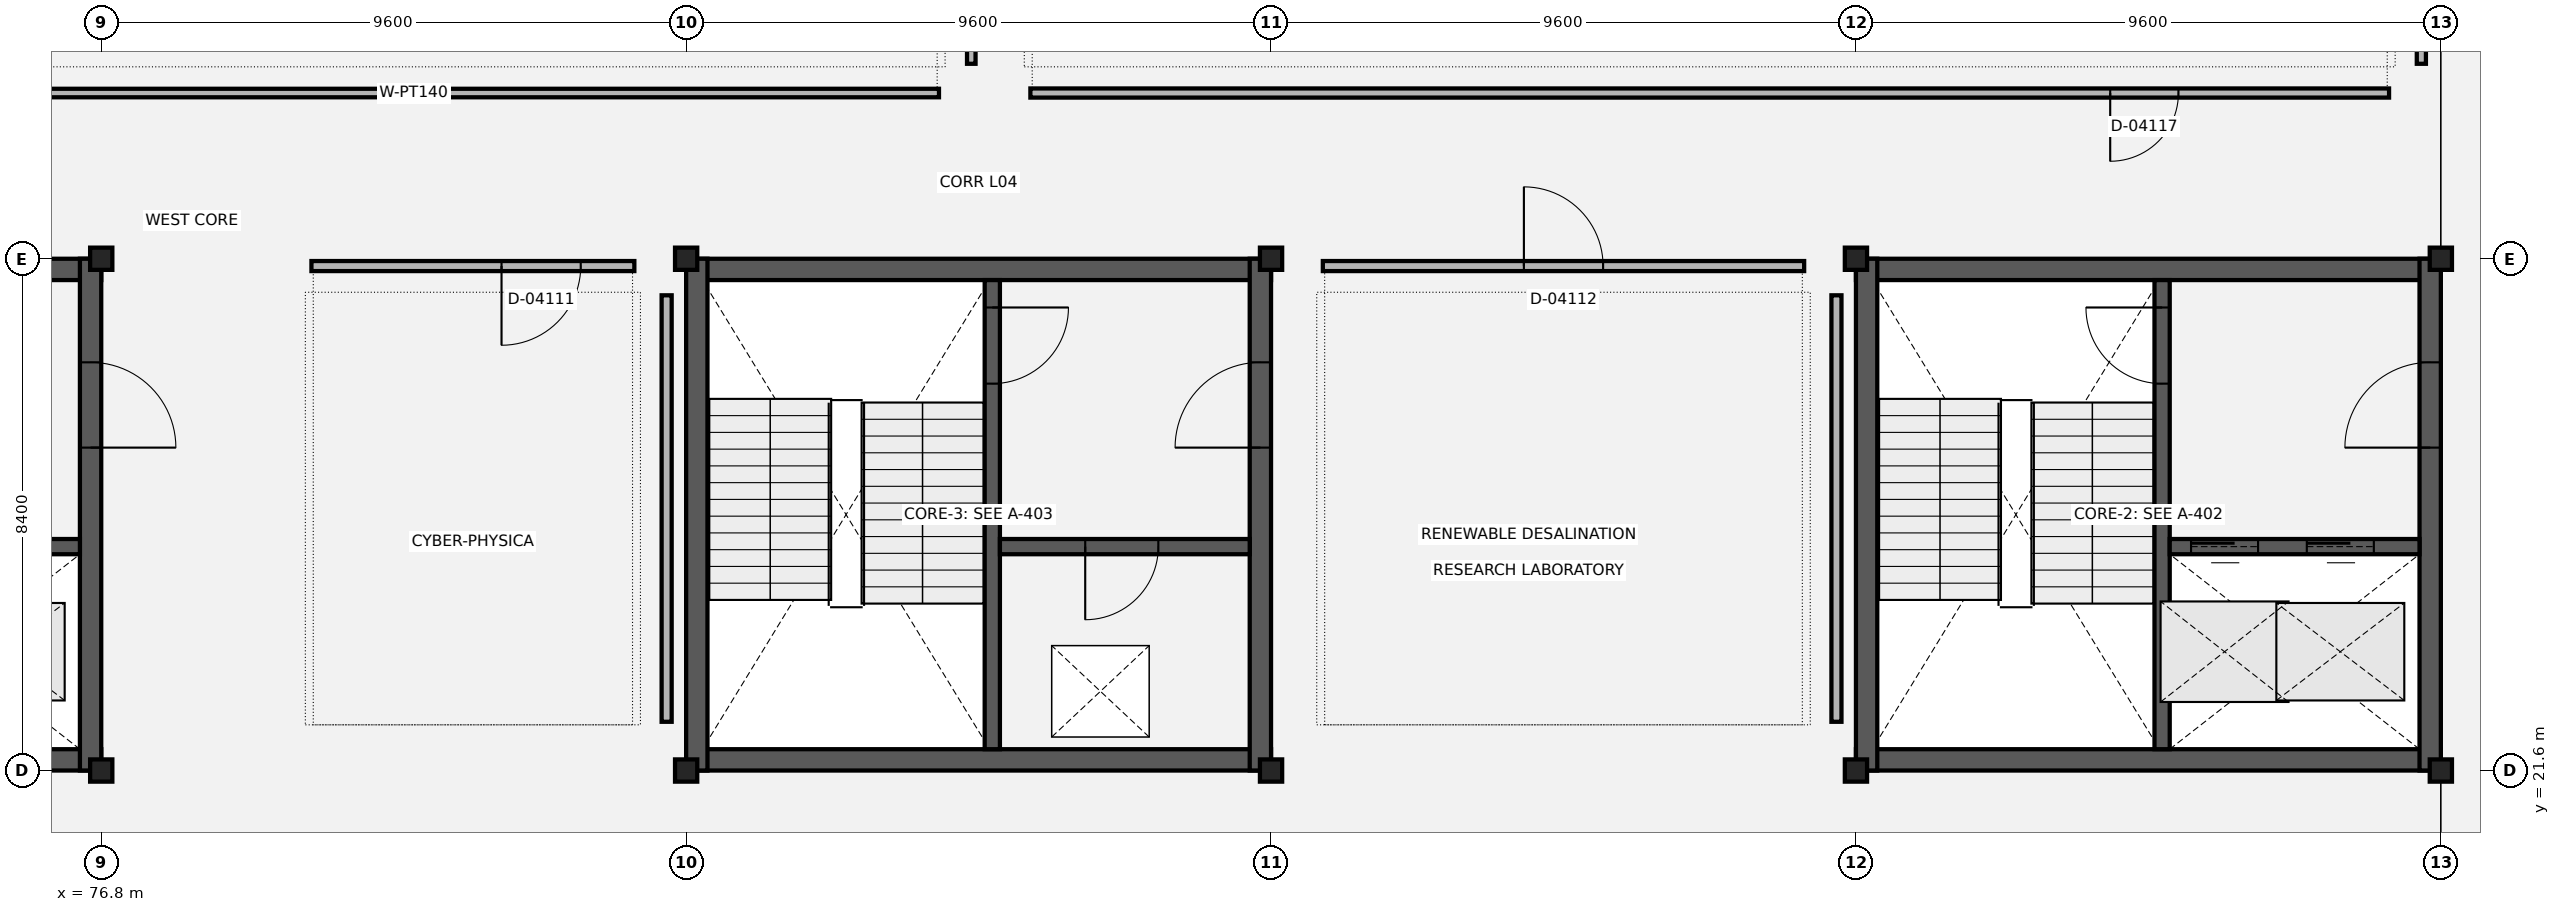
"""IFC4 building model, lengths in metres.
Left out: names, types, materials, properties, quantities, classifications, styles, units other than length and angle.
Written with IfcOpenShell. Run it as: python <this file> out.ifc"""

import sys

from ifc_helpers import new_model, si_unit, direction, frame, frame_2d, origin, origin_2d, place, context, subcontext, project, spatial, rectangle, extrude, element, fill, save


model = new_model("IFC4")
c1 = context("Model", 3, precision=1e-05, world=origin(), true_north=direction((0.0, 1.0)))
c2 = subcontext(c1, "Body", "Model", "MODEL_VIEW")
j1 = project(units=[si_unit("LENGTHUNIT", "METRE"), si_unit("PLANEANGLEUNIT", "RADIAN")], contexts=[c1])
p1 = place(None, origin())
s1 = spatial("IfcSite", under=j1, at=p1, CompositionType="ELEMENT")
p2 = place(p1, origin())
s2 = spatial("IfcBuilding", under=s1, at=p2, CompositionType="ELEMENT")
p3 = place(p2, frame((0.0, 0.0, 18.6)))
s3 = spatial("IfcBuildingStorey", under=s2, at=p3, CompositionType="ELEMENT", Elevation=18.6)
for number, where, z_axis, x_axis in (
    (1, (76.8, 21.6, 0.0), (0.0, 0.0, 1.0), (1.0, 0.0, 0.0)),
    (2, (76.8, 30.0, 0.0), (0.0, 0.0, 1.0), (1.0, 0.0, 0.0)),
    (3, (86.4, 21.6, 0.0), (0.0, 0.0, 1.0), (1.0, 0.0, 0.0)),
    (4, (86.4, 30.0, 0.0), (0.0, 0.0, 1.0), (1.0, 0.0, 0.0)),
    (5, (96.0, 21.6, 0.0), (0.0, 0.0, 1.0), (1.0, 0.0, 0.0)),
    (6, (96.0, 30.0, 0.0), (0.0, 0.0, 1.0), (1.0, 0.0, 0.0)),
    (7, (105.6, 21.6, 0.0), (0.0, 0.0, 1.0), (1.0, 0.0, 0.0)),
    (8, (105.6, 30.0, 0.0), (0.0, 0.0, 1.0), (1.0, 0.0, 0.0)),
    (9, (115.2, 21.6, 0.0), (0.0, 0.0, 1.0), (1.0, 0.0, 0.0)),
    (10, (115.2, 30.0, 0.0), (0.0, 0.0, 1.0), (1.0, 0.0, 0.0)),
):
    element("IfcColumn", number, at=place(p3, frame(where, z_axis=z_axis, x_axis=x_axis)), inside=s3, PredefinedType="COLUMN", context=c2, shape_type="SweptSolid", body=[
        extrude(rectangle(XDim=0.365, YDim=0.365, at=origin_2d()), origin(), (0.0, 0.0, 1.0), 4.2),
    ])
for number, where, z_axis, x_axis in (
    (11, (67.2, 29.825, 0.0), (0.0, 0.0, 1.0), (1.0, 0.0, 0.0)),
    (12, (67.2, 21.775, 0.0), (0.0, 0.0, 1.0), (1.0, 0.0, 0.0)),
):
    element("IfcWall", number, at=place(p3, frame(where, z_axis=z_axis, x_axis=x_axis)), inside=s3, PredefinedType="SHEAR", context=c2, shape_type="SweptSolid", body=[
        extrude(rectangle(XDim=9.6, YDim=0.35, at=frame_2d((4.8, 0.0))), origin(), (0.0, 0.0, 1.0), 3.97),
    ])
p4 = place(p3, frame((76.625, 21.6, 0.0), z_axis=(0.0, 0.0, 1.0), x_axis=(0.0, 1.0, 0.0)))
e13 = element("IfcWall", 13, at=p4, inside=s3, PredefinedType="SHEAR", context=c2, shape_type="SweptSolid", body=[
    extrude(rectangle(XDim=8.4, YDim=0.35, at=frame_2d((4.2, 0.0))), origin(), (0.0, 0.0, 1.0), 3.97),
])
p5 = place(p4, frame((5.3, 0.0, 0.0)))
e14 = element("IfcOpeningElement", 14, at=p5, cuts=e13, PredefinedType="OPENING", context=c2, shape_type="SweptSolid", body=[
    extrude(rectangle(XDim=1.4, YDim=2.15, at=frame_2d((0.7, 1.075))), frame((0.0, 0.185, 0.0), z_axis=(0.0, -1.0, 0.0), x_axis=(1.0, 0.0, 0.0)), (0.0, 0.0, 1.0), 0.37),
])
p6 = place(p3, frame((72.35, 25.275, 0.0), z_axis=(0.0, 0.0, 1.0), x_axis=(1.0, 0.0, 0.0)))
e15 = element("IfcWall", 15, at=p6, inside=s3, PredefinedType="SHEAR", context=c2, shape_type="SweptSolid", body=[
    extrude(rectangle(XDim=4.1, YDim=0.25, at=frame_2d((2.05, 0.0))), origin(), (0.0, 0.0, 1.0), 3.97),
])
p7 = place(p6, frame((0.35, 0.0, 0.0)))
e16 = element("IfcOpeningElement", 16, at=p7, cuts=e15, PredefinedType="OPENING", context=c2, shape_type="SweptSolid", body=[
    extrude(rectangle(XDim=1.1, YDim=2.15, at=frame_2d((0.55, 1.075))), frame((0.0, 0.135, 0.0), z_axis=(0.0, -1.0, 0.0), x_axis=(1.0, 0.0, 0.0)), (0.0, 0.0, 1.0), 0.27),
])
p8 = place(p6, frame((2.25, 0.0, 0.0)))
e17 = element("IfcOpeningElement", 17, at=p8, cuts=e15, PredefinedType="OPENING", context=c2, shape_type="SweptSolid", body=[
    extrude(rectangle(XDim=1.1, YDim=2.15, at=frame_2d((0.55, 1.075))), frame((0.0, 0.135, 0.0), z_axis=(0.0, -1.0, 0.0), x_axis=(1.0, 0.0, 0.0)), (0.0, 0.0, 1.0), 0.27),
])
for number, where, z_axis, x_axis in (
    (18, (105.6, 29.825, 0.0), (0.0, 0.0, 1.0), (1.0, 0.0, 0.0)),
    (19, (105.6, 21.775, 0.0), (0.0, 0.0, 1.0), (1.0, 0.0, 0.0)),
):
    element("IfcWall", number, at=place(p3, frame(where, z_axis=z_axis, x_axis=x_axis)), inside=s3, PredefinedType="SHEAR", context=c2, shape_type="SweptSolid", body=[
        extrude(rectangle(XDim=9.6, YDim=0.35, at=frame_2d((4.8, 0.0))), origin(), (0.0, 0.0, 1.0), 3.97),
    ])
p9 = place(p3, frame((105.775, 21.6, 0.0), z_axis=(0.0, 0.0, 1.0), x_axis=(0.0, 1.0, 0.0)))
e20 = element("IfcWall", 20, at=p9, inside=s3, PredefinedType="SHEAR", context=c2, shape_type="SweptSolid", body=[
    extrude(rectangle(XDim=8.4, YDim=0.35, at=frame_2d((4.2, 0.0))), origin(), (0.0, 0.0, 1.0), 3.97),
])
p10 = place(p3, frame((115.025, 21.6, 0.0), z_axis=(0.0, 0.0, 1.0), x_axis=(0.0, 1.0, 0.0)))
e21 = element("IfcWall", 21, at=p10, inside=s3, PredefinedType="SHEAR", context=c2, shape_type="SweptSolid", body=[
    extrude(rectangle(XDim=8.4, YDim=0.35, at=frame_2d((4.2, 0.0))), origin(), (0.0, 0.0, 1.0), 3.97),
])
p11 = place(p10, frame((5.3, 0.0, 0.0)))
e22 = element("IfcOpeningElement", 22, at=p11, cuts=e21, PredefinedType="OPENING", context=c2, shape_type="SweptSolid", body=[
    extrude(rectangle(XDim=1.4, YDim=2.15, at=frame_2d((0.7, 1.075))), frame((0.0, 0.185, 0.0), z_axis=(0.0, -1.0, 0.0), x_axis=(1.0, 0.0, 0.0)), (0.0, 0.0, 1.0), 0.37),
])
p12 = place(p3, frame((110.625, 29.65, 0.0), z_axis=(0.0, 0.0, 1.0), x_axis=(0.0, -1.0, 0.0)))
e23 = element("IfcWall", 23, at=p12, inside=s3, PredefinedType="SHEAR", context=c2, shape_type="SweptSolid", body=[
    extrude(rectangle(XDim=7.7, YDim=0.25, at=frame_2d((3.85, 0.0))), origin(), (0.0, 0.0, 1.0), 3.97),
])
p13 = place(p12, frame((0.45, 0.0, 0.0)))
e24 = element("IfcOpeningElement", 24, at=p13, cuts=e23, PredefinedType="OPENING", context=c2, shape_type="SweptSolid", body=[
    extrude(rectangle(XDim=1.25, YDim=2.15, at=frame_2d((0.625, 1.075))), frame((0.0, 0.135, 0.0), z_axis=(0.0, -1.0, 0.0), x_axis=(1.0, 0.0, 0.0)), (0.0, 0.0, 1.0), 0.27),
])
p14 = place(p3, frame((110.75, 25.275, 0.0), z_axis=(0.0, 0.0, 1.0), x_axis=(1.0, 0.0, 0.0)))
e25 = element("IfcWall", 25, at=p14, inside=s3, PredefinedType="SHEAR", context=c2, shape_type="SweptSolid", body=[
    extrude(rectangle(XDim=4.1, YDim=0.25, at=frame_2d((2.05, 0.0))), origin(), (0.0, 0.0, 1.0), 3.97),
])
p15 = place(p14, frame((0.35, 0.0, 0.0)))
e26 = element("IfcOpeningElement", 26, at=p15, cuts=e25, PredefinedType="OPENING", context=c2, shape_type="SweptSolid", body=[
    extrude(rectangle(XDim=1.1, YDim=2.15, at=frame_2d((0.55, 1.075))), frame((0.0, 0.135, 0.0), z_axis=(0.0, -1.0, 0.0), x_axis=(1.0, 0.0, 0.0)), (0.0, 0.0, 1.0), 0.27),
])
p16 = place(p14, frame((2.25, 0.0, 0.0)))
e27 = element("IfcOpeningElement", 27, at=p16, cuts=e25, PredefinedType="OPENING", context=c2, shape_type="SweptSolid", body=[
    extrude(rectangle(XDim=1.1, YDim=2.15, at=frame_2d((0.55, 1.075))), frame((0.0, 0.135, 0.0), z_axis=(0.0, -1.0, 0.0), x_axis=(1.0, 0.0, 0.0)), (0.0, 0.0, 1.0), 0.27),
])
for number, where, z_axis, x_axis in (
    (28, (86.4, 29.825, 0.0), (0.0, 0.0, 1.0), (1.0, 0.0, 0.0)),
    (29, (86.4, 21.775, 0.0), (0.0, 0.0, 1.0), (1.0, 0.0, 0.0)),
):
    element("IfcWall", number, at=place(p3, frame(where, z_axis=z_axis, x_axis=x_axis)), inside=s3, PredefinedType="SHEAR", context=c2, shape_type="SweptSolid", body=[
        extrude(rectangle(XDim=9.6, YDim=0.35, at=frame_2d((4.8, 0.0))), origin(), (0.0, 0.0, 1.0), 3.97),
    ])
p17 = place(p3, frame((86.575, 21.6, 0.0), z_axis=(0.0, 0.0, 1.0), x_axis=(0.0, 1.0, 0.0)))
e30 = element("IfcWall", 30, at=p17, inside=s3, PredefinedType="SHEAR", context=c2, shape_type="SweptSolid", body=[
    extrude(rectangle(XDim=8.4, YDim=0.35, at=frame_2d((4.2, 0.0))), origin(), (0.0, 0.0, 1.0), 3.97),
])
p18 = place(p3, frame((95.825, 21.6, 0.0), z_axis=(0.0, 0.0, 1.0), x_axis=(0.0, 1.0, 0.0)))
e31 = element("IfcWall", 31, at=p18, inside=s3, PredefinedType="SHEAR", context=c2, shape_type="SweptSolid", body=[
    extrude(rectangle(XDim=8.4, YDim=0.35, at=frame_2d((4.2, 0.0))), origin(), (0.0, 0.0, 1.0), 3.97),
])
p19 = place(p18, frame((5.3, 0.0, 0.0)))
e32 = element("IfcOpeningElement", 32, at=p19, cuts=e31, PredefinedType="OPENING", context=c2, shape_type="SweptSolid", body=[
    extrude(rectangle(XDim=1.4, YDim=2.15, at=frame_2d((0.7, 1.075))), frame((0.0, 0.185, 0.0), z_axis=(0.0, -1.0, 0.0), x_axis=(1.0, 0.0, 0.0)), (0.0, 0.0, 1.0), 0.37),
])
p20 = place(p3, frame((91.425, 29.65, 0.0), z_axis=(0.0, 0.0, 1.0), x_axis=(0.0, -1.0, 0.0)))
e33 = element("IfcWall", 33, at=p20, inside=s3, PredefinedType="SHEAR", context=c2, shape_type="SweptSolid", body=[
    extrude(rectangle(XDim=7.7, YDim=0.25, at=frame_2d((3.85, 0.0))), origin(), (0.0, 0.0, 1.0), 3.97),
])
p21 = place(p20, frame((0.45, 0.0, 0.0)))
e34 = element("IfcOpeningElement", 34, at=p21, cuts=e33, PredefinedType="OPENING", context=c2, shape_type="SweptSolid", body=[
    extrude(rectangle(XDim=1.25, YDim=2.15, at=frame_2d((0.625, 1.075))), frame((0.0, 0.135, 0.0), z_axis=(0.0, -1.0, 0.0), x_axis=(1.0, 0.0, 0.0)), (0.0, 0.0, 1.0), 0.27),
])
p22 = place(p3, frame((91.55, 25.275, 0.0), z_axis=(0.0, 0.0, 1.0), x_axis=(1.0, 0.0, 0.0)))
e35 = element("IfcWall", 35, at=p22, inside=s3, PredefinedType="SHEAR", context=c2, shape_type="SweptSolid", body=[
    extrude(rectangle(XDim=4.1, YDim=0.25, at=frame_2d((2.05, 0.0))), origin(), (0.0, 0.0, 1.0), 3.97),
])
p23 = place(p22, frame((1.4, 0.0, 0.0)))
e36 = element("IfcOpeningElement", 36, at=p23, cuts=e35, PredefinedType="OPENING", context=c2, shape_type="SweptSolid", body=[
    extrude(rectangle(XDim=1.2, YDim=2.15, at=frame_2d((0.6, 1.075))), frame((0.0, 0.135, 0.0), z_axis=(0.0, -1.0, 0.0), x_axis=(1.0, 0.0, 0.0)), (0.0, 0.0, 1.0), 0.27),
])
p24 = place(p3, frame((80.25, 29.88, 0.0), z_axis=(0.0, 0.0, 1.0), x_axis=(1.0, 0.0, 0.0)))
e37 = element("IfcWall", 37, at=p24, inside=s3, PredefinedType="PARTITIONING", context=c2, shape_type="SweptSolid", body=[
    extrude(rectangle(XDim=5.3, YDim=0.165, at=frame_2d((2.65, 0.0))), origin(), (0.0, 0.0, 1.0), 3.05),
])
p25 = place(p24, frame((3.12, 0.0, 0.0)))
e38 = element("IfcOpeningElement", 38, at=p25, cuts=e37, PredefinedType="OPENING", context=c2, shape_type="SweptSolid", body=[
    extrude(rectangle(XDim=1.3, YDim=2.15, at=frame_2d((0.65, 1.075))), frame((0.0, 0.093, 0.0), z_axis=(0.0, -1.0, 0.0), x_axis=(1.0, 0.0, 0.0)), (0.0, 0.0, 1.0), 0.185),
])
p26 = place(p3, frame((86.08, 22.4, 0.0), z_axis=(0.0, 0.0, 1.0), x_axis=(0.0, 1.0, 0.0)))
e39 = element("IfcWall", 39, at=p26, inside=s3, PredefinedType="PARTITIONING", context=c2, shape_type="SweptSolid", body=[
    extrude(rectangle(XDim=7.0, YDim=0.165, at=frame_2d((3.5, 0.0))), origin(), (0.0, 0.0, 1.0), 3.05),
])
p27 = place(p3, frame((96.85, 29.88, 0.0), z_axis=(0.0, 0.0, 1.0), x_axis=(1.0, 0.0, 0.0)))
e40 = element("IfcWall", 40, at=p27, inside=s3, PredefinedType="PARTITIONING", context=c2, shape_type="SweptSolid", body=[
    extrude(rectangle(XDim=7.9, YDim=0.165, at=frame_2d((3.95, 0.0))), origin(), (0.0, 0.0, 1.0), 3.05),
])
p28 = place(p27, frame((3.3, 0.0, 0.0)))
e41 = element("IfcOpeningElement", 41, at=p28, cuts=e40, PredefinedType="OPENING", context=c2, shape_type="SweptSolid", body=[
    extrude(rectangle(XDim=1.3, YDim=2.15, at=frame_2d((0.65, 1.075))), frame((0.0, 0.093, 0.0), z_axis=(0.0, -1.0, 0.0), x_axis=(1.0, 0.0, 0.0)), (0.0, 0.0, 1.0), 0.185),
])
p29 = place(p3, frame((105.28, 22.4, 0.0), z_axis=(0.0, 0.0, 1.0), x_axis=(0.0, 1.0, 0.0)))
e42 = element("IfcWall", 42, at=p29, inside=s3, PredefinedType="PARTITIONING", context=c2, shape_type="SweptSolid", body=[
    extrude(rectangle(XDim=7.0, YDim=0.165, at=frame_2d((3.5, 0.0))), origin(), (0.0, 0.0, 1.0), 3.05),
])
p30 = place(p3, frame((67.85, 32.72, 0.0), z_axis=(0.0, 0.0, 1.0), x_axis=(1.0, 0.0, 0.0)))
e43 = element("IfcWall", 43, at=p30, inside=s3, PredefinedType="PARTITIONING", context=c2, shape_type="SweptSolid", body=[
    extrude(rectangle(XDim=22.7, YDim=0.14, at=frame_2d((11.35, 0.0))), origin(), (0.0, 0.0, 1.0), 3.05),
])
p31 = place(p30, frame((3.523, 0.0, 0.0)))
e44 = element("IfcOpeningElement", 44, at=p31, cuts=e43, PredefinedType="OPENING", context=c2, shape_type="SweptSolid", body=[
    extrude(rectangle(XDim=1.08, YDim=2.15, at=frame_2d((0.54, 1.075))), frame((0.0, 0.08, 0.0), z_axis=(0.0, -1.0, 0.0), x_axis=(1.0, 0.0, 0.0)), (0.0, 0.0, 1.0), 0.16),
])
p32 = place(p3, frame((91.08, 33.2, 0.0), z_axis=(0.0, 0.0, 1.0), x_axis=(0.0, 1.0, 0.0)))
e45 = element("IfcWall", 45, at=p32, inside=s3, PredefinedType="PARTITIONING", context=c2, shape_type="SweptSolid", body=[
    extrude(rectangle(XDim=4.2, YDim=0.14, at=frame_2d((2.1, 0.0))), origin(), (0.0, 0.0, 1.0), 3.05),
])
p33 = place(p3, frame((92.05, 32.72, 0.0), z_axis=(0.0, 0.0, 1.0), x_axis=(1.0, 0.0, 0.0)))
e46 = element("IfcWall", 46, at=p33, inside=s3, PredefinedType="PARTITIONING", context=c2, shape_type="SweptSolid", body=[
    extrude(rectangle(XDim=22.3, YDim=0.15, at=frame_2d((11.15, 0.0))), origin(), (0.0, 0.0, 1.0), 3.05),
])
p34 = place(p33, frame((17.723, 0.0, 0.0)))
e47 = element("IfcOpeningElement", 47, at=p34, cuts=e46, PredefinedType="OPENING", context=c2, shape_type="SweptSolid", body=[
    extrude(rectangle(XDim=1.12, YDim=2.15, at=frame_2d((0.56, 1.075))), frame((0.0, 0.085, 0.0), z_axis=(0.0, -1.0, 0.0), x_axis=(1.0, 0.0, 0.0)), (0.0, 0.0, 1.0), 0.17),
])
p35 = place(p3, frame((114.88, 33.2, 0.0), z_axis=(0.0, 0.0, 1.0), x_axis=(0.0, 1.0, 0.0)))
e48 = element("IfcWall", 48, at=p35, inside=s3, PredefinedType="PARTITIONING", context=c2, shape_type="SweptSolid", body=[
    extrude(rectangle(XDim=4.2, YDim=0.15, at=frame_2d((2.1, 0.0))), origin(), (0.0, 0.0, 1.0), 3.05),
])
p36 = place(p5, origin())
e49 = element("IfcDoor", 49, at=p36, inside=s3, OperationType="SINGLE_SWING_RIGHT", PredefinedType="DOOR", context=c2, shape_type="SweptSolid", body=[
    extrude(rectangle(XDim=1.4, YDim=2.15, at=frame_2d((0.7, 1.075))), frame((0.0, 0.025, 0.0), z_axis=(0.0, -1.0, 0.0), x_axis=(1.0, 0.0, 0.0)), (0.0, 0.0, 1.0), 0.05),
])
fill(e14, e49)
p37 = place(p13, origin())
e50 = element("IfcDoor", 50, at=p37, inside=s3, OperationType="SINGLE_SWING_RIGHT", PredefinedType="DOOR", context=c2, shape_type="SweptSolid", body=[
    extrude(rectangle(XDim=1.25, YDim=2.15, at=frame_2d((0.625, 1.075))), frame((0.0, 0.025, 0.0), z_axis=(0.0, -1.0, 0.0), x_axis=(1.0, 0.0, 0.0)), (0.0, 0.0, 1.0), 0.05),
])
fill(e24, e50)
p38 = place(p15, origin())
e51 = element("IfcDoor", 51, at=p38, inside=s3, OperationType="SLIDING_TO_LEFT", PredefinedType="DOOR", context=c2, shape_type="SweptSolid", body=[
    extrude(rectangle(XDim=1.1, YDim=2.15, at=frame_2d((0.55, 1.075))), frame((0.0, 0.025, 0.0), z_axis=(0.0, -1.0, 0.0), x_axis=(1.0, 0.0, 0.0)), (0.0, 0.0, 1.0), 0.05),
])
fill(e26, e51)
p39 = place(p16, origin())
e52 = element("IfcDoor", 52, at=p39, inside=s3, OperationType="SLIDING_TO_LEFT", PredefinedType="DOOR", context=c2, shape_type="SweptSolid", body=[
    extrude(rectangle(XDim=1.1, YDim=2.15, at=frame_2d((0.55, 1.075))), frame((0.0, 0.025, 0.0), z_axis=(0.0, -1.0, 0.0), x_axis=(1.0, 0.0, 0.0)), (0.0, 0.0, 1.0), 0.05),
])
fill(e27, e52)
p40 = place(p11, origin())
e53 = element("IfcDoor", 53, at=p40, inside=s3, OperationType="SINGLE_SWING_LEFT", PredefinedType="DOOR", context=c2, shape_type="SweptSolid", body=[
    extrude(rectangle(XDim=1.4, YDim=2.15, at=frame_2d((0.7, 1.075))), frame((0.0, 0.025, 0.0), z_axis=(0.0, -1.0, 0.0), x_axis=(1.0, 0.0, 0.0)), (0.0, 0.0, 1.0), 0.05),
])
fill(e22, e53)
p41 = place(p21, origin())
e54 = element("IfcDoor", 54, at=p41, inside=s3, OperationType="SINGLE_SWING_LEFT", PredefinedType="DOOR", context=c2, shape_type="SweptSolid", body=[
    extrude(rectangle(XDim=1.25, YDim=2.15, at=frame_2d((0.625, 1.075))), frame((0.0, 0.025, 0.0), z_axis=(0.0, -1.0, 0.0), x_axis=(1.0, 0.0, 0.0)), (0.0, 0.0, 1.0), 0.05),
])
fill(e34, e54)
p42 = place(p23, origin())
e55 = element("IfcDoor", 55, at=p42, inside=s3, OperationType="SINGLE_SWING_RIGHT", PredefinedType="DOOR", context=c2, shape_type="SweptSolid", body=[
    extrude(rectangle(XDim=1.2, YDim=2.15, at=frame_2d((0.6, 1.075))), frame((0.0, 0.025, 0.0), z_axis=(0.0, -1.0, 0.0), x_axis=(1.0, 0.0, 0.0)), (0.0, 0.0, 1.0), 0.05),
])
fill(e36, e55)
p43 = place(p19, origin())
e56 = element("IfcDoor", 56, at=p43, inside=s3, OperationType="SINGLE_SWING_LEFT", PredefinedType="DOOR", context=c2, shape_type="SweptSolid", body=[
    extrude(rectangle(XDim=1.4, YDim=2.15, at=frame_2d((0.7, 1.075))), frame((0.0, 0.025, 0.0), z_axis=(0.0, -1.0, 0.0), x_axis=(1.0, 0.0, 0.0)), (0.0, 0.0, 1.0), 0.05),
])
fill(e32, e56)
p44 = place(p25, origin())
e57 = element("IfcDoor", 57, at=p44, inside=s3, OperationType="SINGLE_SWING_RIGHT", PredefinedType="DOOR", context=c2, shape_type="SweptSolid", body=[
    extrude(rectangle(XDim=1.3, YDim=2.15, at=frame_2d((0.65, 1.075))), frame((0.0, 0.025, 0.0), z_axis=(0.0, -1.0, 0.0), x_axis=(1.0, 0.0, 0.0)), (0.0, 0.0, 1.0), 0.05),
])
fill(e38, e57)
p45 = place(p28, origin())
e58 = element("IfcDoor", 58, at=p45, inside=s3, OperationType="SINGLE_SWING_LEFT", PredefinedType="DOOR", context=c2, shape_type="SweptSolid", body=[
    extrude(rectangle(XDim=1.3, YDim=2.15, at=frame_2d((0.65, 1.075))), frame((0.0, 0.025, 0.0), z_axis=(0.0, -1.0, 0.0), x_axis=(1.0, 0.0, 0.0)), (0.0, 0.0, 1.0), 0.05),
])
fill(e41, e58)
p46 = place(p34, origin())
e59 = element("IfcDoor", 59, at=p46, inside=s3, OperationType="SINGLE_SWING_RIGHT", PredefinedType="DOOR", context=c2, shape_type="SweptSolid", body=[
    extrude(rectangle(XDim=1.12, YDim=2.15, at=frame_2d((0.56, 1.075))), frame((0.0, 0.025, 0.0), z_axis=(0.0, -1.0, 0.0), x_axis=(1.0, 0.0, 0.0)), (0.0, 0.0, 1.0), 0.05),
])
fill(e47, e59)
save(model, sys.argv[1])
